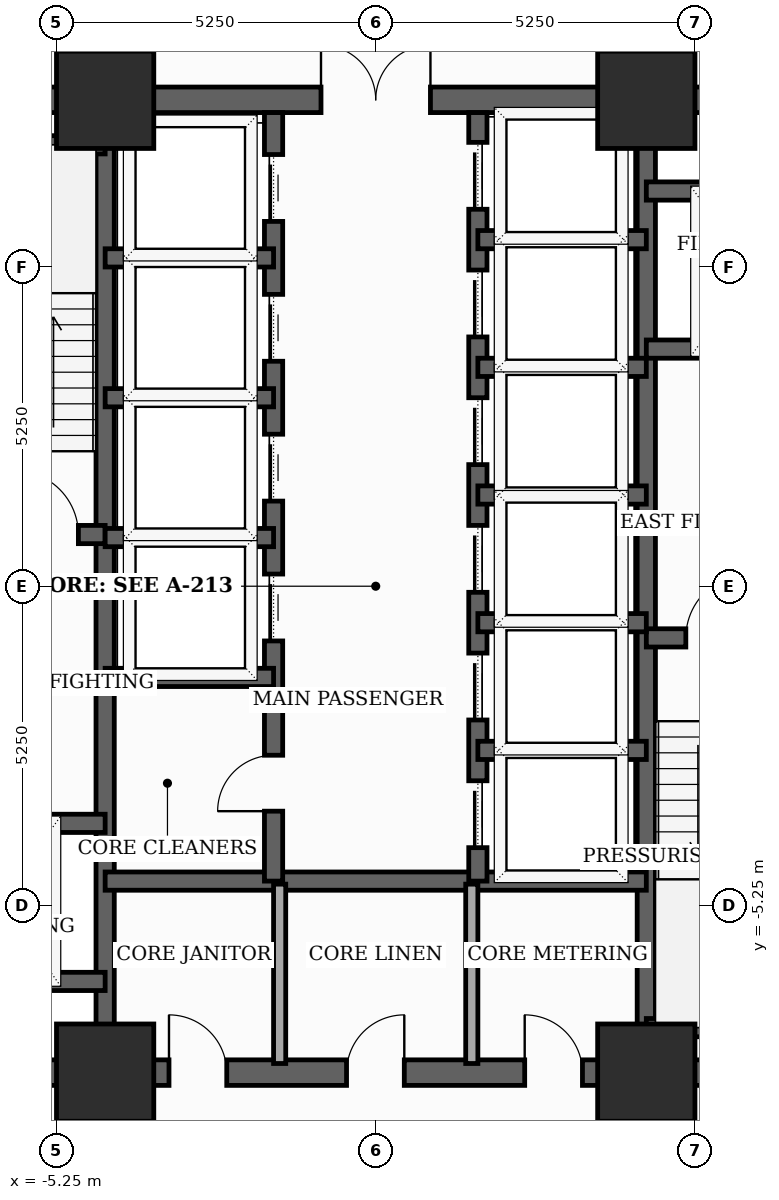
"""IFC4 building model, lengths in metres.
Left out: names, types, materials, properties, quantities, classifications, styles, units other than length and angle.
Written with IfcOpenShell. Run it as: python <this file> out.ifc"""

import sys

from ifc_helpers import new_model, si_unit, direction, frame, frame_2d, origin, origin_2d, place, context, subcontext, project, spatial, rectangle, extrude, element, fill, save


model = new_model("IFC4")
c1 = context("Model", 3, precision=1e-05, world=origin(), true_north=direction((0.0, 1.0)))
c2 = subcontext(c1, "Body", "Model", "MODEL_VIEW")
j1 = project(units=[si_unit("LENGTHUNIT", "METRE"), si_unit("PLANEANGLEUNIT", "RADIAN")], contexts=[c1])
p1 = place(None, origin())
s1 = spatial("IfcSite", under=j1, at=p1, CompositionType="ELEMENT")
p2 = place(p1, origin())
s2 = spatial("IfcBuilding", under=s1, at=p2, CompositionType="ELEMENT")
p3 = place(p2, frame((0.0, 0.0, 40.8)))
s3 = spatial("IfcBuildingStorey", under=s2, at=p3, CompositionType="ELEMENT", Elevation=40.8)
for number, where, z_axis, x_axis in (
    (1, (-4.45, -8.0, 0.0), (0.0, 0.0, 1.0), (1.0, 0.0, 0.0)),
    (2, (4.45, -8.0, 0.0), (0.0, 0.0, 1.0), (1.0, 0.0, 0.0)),
    (3, (4.45, 8.0, 0.0), (0.0, 0.0, 1.0), (1.0, 0.0, 0.0)),
    (4, (-4.45, 8.0, 0.0), (0.0, 0.0, 1.0), (1.0, 0.0, 0.0)),
):
    element("IfcColumn", number, at=place(p3, frame(where, z_axis=z_axis, x_axis=x_axis)), inside=s3, PredefinedType="COLUMN", context=c2, shape_type="SweptSolid", body=[
        extrude(rectangle(XDim=1.6, YDim=1.6, at=origin_2d()), origin(), (0.0, 0.0, 1.0), 3.7),
    ])
p4 = place(p3, frame((-8.0, -8.0, 0.0), z_axis=(0.0, 0.0, 1.0), x_axis=(1.0, 0.0, 0.0)))
e5 = element("IfcWall", 5, at=p4, inside=s3, PredefinedType="SHEAR", context=c2, shape_type="SweptSolid", body=[
    extrude(rectangle(XDim=16.0, YDim=0.42, at=frame_2d((8.0, 0.0))), origin(), (0.0, 0.0, 1.0), 3.5),
])
p5 = place(p4, frame((4.6, 0.0, 0.0)))
e6 = element("IfcOpeningElement", 6, at=p5, cuts=e5, PredefinedType="OPENING", context=c2, shape_type="SweptSolid", body=[
    extrude(rectangle(XDim=0.95, YDim=2.1, at=frame_2d((0.475, 1.05))), frame((0.0, 0.22, 0.0), z_axis=(0.0, -1.0, 0.0), x_axis=(1.0, 0.0, 0.0)), (0.0, 0.0, 1.0), 0.44),
])
p6 = place(p4, frame((7.52, 0.0, 0.0)))
e7 = element("IfcOpeningElement", 7, at=p6, cuts=e5, PredefinedType="OPENING", context=c2, shape_type="SweptSolid", body=[
    extrude(rectangle(XDim=0.95, YDim=2.1, at=frame_2d((0.475, 1.05))), frame((0.0, 0.22, 0.0), z_axis=(0.0, -1.0, 0.0), x_axis=(1.0, 0.0, 0.0)), (0.0, 0.0, 1.0), 0.44),
])
p7 = place(p4, frame((10.45, 0.0, 0.0)))
e8 = element("IfcOpeningElement", 8, at=p7, cuts=e5, PredefinedType="OPENING", context=c2, shape_type="SweptSolid", body=[
    extrude(rectangle(XDim=0.95, YDim=2.1, at=frame_2d((0.475, 1.05))), frame((0.0, 0.22, 0.0), z_axis=(0.0, -1.0, 0.0), x_axis=(1.0, 0.0, 0.0)), (0.0, 0.0, 1.0), 0.44),
])
p8 = place(p3, frame((-8.0, 8.0, 0.0), z_axis=(0.0, 0.0, 1.0), x_axis=(1.0, 0.0, 0.0)))
e9 = element("IfcWall", 9, at=p8, inside=s3, PredefinedType="SHEAR", context=c2, shape_type="SweptSolid", body=[
    extrude(rectangle(XDim=16.0, YDim=0.42, at=frame_2d((8.0, 0.0))), origin(), (0.0, 0.0, 1.0), 3.5),
])
p9 = place(p8, frame((7.1, 0.0, 0.0)))
e10 = element("IfcOpeningElement", 10, at=p9, cuts=e9, PredefinedType="OPENING", context=c2, shape_type="SweptSolid", body=[
    extrude(rectangle(XDim=1.8, YDim=2.15, at=frame_2d((0.9, 1.075))), frame((0.0, 0.22, 0.0), z_axis=(0.0, -1.0, 0.0), x_axis=(1.0, 0.0, 0.0)), (0.0, 0.0, 1.0), 0.44),
])
for number, where, z_axis, x_axis in (
    (11, (-4.45, -7.79, 0.0), (0.0, 0.0, 1.0), (0.0, 1.0, 0.0)),
    (12, (4.45, -7.79, 0.0), (0.0, 0.0, 1.0), (0.0, 1.0, 0.0)),
):
    element("IfcWall", number, at=place(p3, frame(where, z_axis=z_axis, x_axis=x_axis)), inside=s3, PredefinedType="SHEAR", context=c2, shape_type="SweptSolid", body=[
        extrude(rectangle(XDim=15.58, YDim=0.3, at=frame_2d((7.79, 0.0))), origin(), (0.0, 0.0, 1.0), 3.5),
    ])
p10 = place(p3, frame((-7.79, 0.85, 0.0), z_axis=(0.0, 0.0, 1.0), x_axis=(1.0, 0.0, 0.0)))
e13 = element("IfcWall", 13, at=p10, inside=s3, PredefinedType="SHEAR", context=c2, shape_type="SweptSolid", body=[
    extrude(rectangle(XDim=3.34, YDim=0.3, at=frame_2d((1.67, 0.0))), origin(), (0.0, 0.0, 1.0), 3.5),
])
p11 = place(p10, frame((1.85, 0.0, 0.0)))
e14 = element("IfcOpeningElement", 14, at=p11, cuts=e13, PredefinedType="OPENING", context=c2, shape_type="SweptSolid", body=[
    extrude(rectangle(XDim=1.05, YDim=2.15, at=frame_2d((0.525, 1.075))), frame((0.0, 0.16, 0.0), z_axis=(0.0, -1.0, 0.0), x_axis=(1.0, 0.0, 0.0)), (0.0, 0.0, 1.0), 0.32),
])
p12 = place(p3, frame((-7.79, 7.26, 0.0), z_axis=(0.0, 0.0, 1.0), x_axis=(1.0, 0.0, 0.0)))
e15 = element("IfcWall", 15, at=p12, inside=s3, PredefinedType="SHEAR", context=c2, shape_type="SweptSolid", body=[
    extrude(rectangle(XDim=3.34, YDim=0.3, at=frame_2d((1.67, 0.0))), origin(), (0.0, 0.0, 1.0), 3.5),
])
p13 = place(p3, frame((4.45, -0.85, 0.0), z_axis=(0.0, 0.0, 1.0), x_axis=(1.0, 0.0, 0.0)))
e16 = element("IfcWall", 16, at=p13, inside=s3, PredefinedType="SHEAR", context=c2, shape_type="SweptSolid", body=[
    extrude(rectangle(XDim=3.34, YDim=0.3, at=frame_2d((1.67, 0.0))), origin(), (0.0, 0.0, 1.0), 3.5),
])
p14 = place(p13, frame((0.65, 0.0, 0.0)))
e17 = element("IfcOpeningElement", 17, at=p14, cuts=e16, PredefinedType="OPENING", context=c2, shape_type="SweptSolid", body=[
    extrude(rectangle(XDim=1.05, YDim=2.15, at=frame_2d((0.525, 1.075))), frame((0.0, 0.16, 0.0), z_axis=(0.0, -1.0, 0.0), x_axis=(1.0, 0.0, 0.0)), (0.0, 0.0, 1.0), 0.32),
])
p15 = place(p3, frame((4.45, -7.26, 0.0), z_axis=(0.0, 0.0, 1.0), x_axis=(1.0, 0.0, 0.0)))
e18 = element("IfcWall", 18, at=p15, inside=s3, PredefinedType="SHEAR", context=c2, shape_type="SweptSolid", body=[
    extrude(rectangle(XDim=3.55, YDim=0.3, at=frame_2d((1.775, 0.0))), origin(), (0.0, 0.0, 1.0), 3.5),
])
p16 = place(p3, frame((-7.79, -3.9, 0.0), z_axis=(0.0, 0.0, 1.0), x_axis=(1.0, 0.0, 0.0)))
e19 = element("IfcWall", 19, at=p16, inside=s3, PredefinedType="SHEAR", context=c2, shape_type="SweptSolid", body=[
    extrude(rectangle(XDim=3.34, YDim=0.3, at=frame_2d((1.67, 0.0))), origin(), (0.0, 0.0, 1.0), 3.5),
])
p17 = place(p16, frame((1.27, 0.0, 0.0)))
e20 = element("IfcOpeningElement", 20, at=p17, cuts=e19, PredefinedType="OPENING", context=c2, shape_type="SweptSolid", body=[
    extrude(rectangle(XDim=1.1, YDim=2.1, at=frame_2d((0.55, 1.05))), frame((0.0, 0.16, 0.0), z_axis=(0.0, -1.0, 0.0), x_axis=(1.0, 0.0, 0.0)), (0.0, 0.0, 1.0), 0.32),
])
p18 = place(p3, frame((-7.79, -6.5, 0.0), z_axis=(0.0, 0.0, 1.0), x_axis=(1.0, 0.0, 0.0)))
e21 = element("IfcWall", 21, at=p18, inside=s3, PredefinedType="SHEAR", context=c2, shape_type="SweptSolid", body=[
    extrude(rectangle(XDim=3.34, YDim=0.3, at=frame_2d((1.67, 0.0))), origin(), (0.0, 0.0, 1.0), 3.5),
])
p19 = place(p3, frame((4.45, 3.9, 0.0), z_axis=(0.0, 0.0, 1.0), x_axis=(1.0, 0.0, 0.0)))
e22 = element("IfcWall", 22, at=p19, inside=s3, PredefinedType="SHEAR", context=c2, shape_type="SweptSolid", body=[
    extrude(rectangle(XDim=3.34, YDim=0.3, at=frame_2d((1.67, 0.0))), origin(), (0.0, 0.0, 1.0), 3.5),
])
p20 = place(p19, frame((1.18, 0.0, 0.0)))
e23 = element("IfcOpeningElement", 23, at=p20, cuts=e22, PredefinedType="OPENING", context=c2, shape_type="SweptSolid", body=[
    extrude(rectangle(XDim=1.1, YDim=2.1, at=frame_2d((0.55, 1.05))), frame((0.0, 0.16, 0.0), z_axis=(0.0, -1.0, 0.0), x_axis=(1.0, 0.0, 0.0)), (0.0, 0.0, 1.0), 0.32),
])
p21 = place(p3, frame((4.45, 6.5, 0.0), z_axis=(0.0, 0.0, 1.0), x_axis=(1.0, 0.0, 0.0)))
e24 = element("IfcWall", 24, at=p21, inside=s3, PredefinedType="SHEAR", context=c2, shape_type="SweptSolid", body=[
    extrude(rectangle(XDim=3.34, YDim=0.3, at=frame_2d((1.67, 0.0))), origin(), (0.0, 0.0, 1.0), 3.5),
])
p22 = place(p3, frame((-4.45, -4.85, 0.0), z_axis=(0.0, 0.0, 1.0), x_axis=(1.0, 0.0, 0.0)))
e25 = element("IfcWall", 25, at=p22, inside=s3, PredefinedType="SHEAR", context=c2, shape_type="SweptSolid", body=[
    extrude(rectangle(XDim=8.9, YDim=0.3, at=frame_2d((4.45, 0.0))), origin(), (0.0, 0.0, 1.0), 3.5),
])
p23 = place(p3, frame((-1.68, -4.85, 0.0), z_axis=(0.0, 0.0, 1.0), x_axis=(0.0, 1.0, 0.0)))
e26 = element("IfcWall", 26, at=p23, inside=s3, PredefinedType="SHEAR", context=c2, shape_type="SweptSolid", body=[
    extrude(rectangle(XDim=12.64, YDim=0.3, at=frame_2d((6.32, 0.0))), origin(), (0.0, 0.0, 1.0), 3.5),
])
p24 = place(p23, frame((3.95, 0.0, 0.0)))
e27 = element("IfcOpeningElement", 27, at=p24, cuts=e26, PredefinedType="OPENING", context=c2, shape_type="SweptSolid", body=[
    extrude(rectangle(XDim=1.1, YDim=2.1, at=frame_2d((0.55, 1.05))), frame((0.0, 0.16, 0.0), z_axis=(0.0, -1.0, 0.0), x_axis=(1.0, 0.0, 0.0)), (0.0, 0.0, 1.0), 0.32),
])
p25 = place(p23, frame((6.25, 0.0, 0.0)))
e28 = element("IfcOpeningElement", 28, at=p25, cuts=e26, PredefinedType="OPENING", context=c2, shape_type="SweptSolid", body=[
    extrude(rectangle(XDim=1.1, YDim=2.1, at=frame_2d((0.55, 1.05))), frame((0.0, 0.16, 0.0), z_axis=(0.0, -1.0, 0.0), x_axis=(1.0, 0.0, 0.0)), (0.0, 0.0, 1.0), 0.32),
])
p26 = place(p23, frame((8.55, 0.0, 0.0)))
e29 = element("IfcOpeningElement", 29, at=p26, cuts=e26, PredefinedType="OPENING", context=c2, shape_type="SweptSolid", body=[
    extrude(rectangle(XDim=1.1, YDim=2.1, at=frame_2d((0.55, 1.05))), frame((0.0, 0.16, 0.0), z_axis=(0.0, -1.0, 0.0), x_axis=(1.0, 0.0, 0.0)), (0.0, 0.0, 1.0), 0.32),
])
p27 = place(p23, frame((10.85, 0.0, 0.0)))
e30 = element("IfcOpeningElement", 30, at=p27, cuts=e26, PredefinedType="OPENING", context=c2, shape_type="SweptSolid", body=[
    extrude(rectangle(XDim=1.1, YDim=2.1, at=frame_2d((0.55, 1.05))), frame((0.0, 0.16, 0.0), z_axis=(0.0, -1.0, 0.0), x_axis=(1.0, 0.0, 0.0)), (0.0, 0.0, 1.0), 0.32),
])
p28 = place(p23, frame((1.15, 0.0, 0.0)))
e31 = element("IfcOpeningElement", 31, at=p28, cuts=e26, PredefinedType="OPENING", context=c2, shape_type="SweptSolid", body=[
    extrude(rectangle(XDim=0.92, YDim=2.1, at=frame_2d((0.46, 1.05))), frame((0.0, 0.16, 0.0), z_axis=(0.0, -1.0, 0.0), x_axis=(1.0, 0.0, 0.0)), (0.0, 0.0, 1.0), 0.32),
])
p29 = place(p3, frame((1.68, -4.85, 0.0), z_axis=(0.0, 0.0, 1.0), x_axis=(0.0, 1.0, 0.0)))
e32 = element("IfcWall", 32, at=p29, inside=s3, PredefinedType="SHEAR", context=c2, shape_type="SweptSolid", body=[
    extrude(rectangle(XDim=12.64, YDim=0.3, at=frame_2d((6.32, 0.0))), origin(), (0.0, 0.0, 1.0), 3.5),
])
p30 = place(p29, frame((0.55, 0.0, 0.0)))
e33 = element("IfcOpeningElement", 33, at=p30, cuts=e32, PredefinedType="OPENING", context=c2, shape_type="SweptSolid", body=[
    extrude(rectangle(XDim=1.1, YDim=2.1, at=frame_2d((0.55, 1.05))), frame((0.0, 0.16, 0.0), z_axis=(0.0, -1.0, 0.0), x_axis=(1.0, 0.0, 0.0)), (0.0, 0.0, 1.0), 0.32),
])
p31 = place(p29, frame((2.65, 0.0, 0.0)))
e34 = element("IfcOpeningElement", 34, at=p31, cuts=e32, PredefinedType="OPENING", context=c2, shape_type="SweptSolid", body=[
    extrude(rectangle(XDim=1.1, YDim=2.1, at=frame_2d((0.55, 1.05))), frame((0.0, 0.16, 0.0), z_axis=(0.0, -1.0, 0.0), x_axis=(1.0, 0.0, 0.0)), (0.0, 0.0, 1.0), 0.32),
])
p32 = place(p29, frame((4.75, 0.0, 0.0)))
e35 = element("IfcOpeningElement", 35, at=p32, cuts=e32, PredefinedType="OPENING", context=c2, shape_type="SweptSolid", body=[
    extrude(rectangle(XDim=1.1, YDim=2.1, at=frame_2d((0.55, 1.05))), frame((0.0, 0.16, 0.0), z_axis=(0.0, -1.0, 0.0), x_axis=(1.0, 0.0, 0.0)), (0.0, 0.0, 1.0), 0.32),
])
p33 = place(p29, frame((6.85, 0.0, 0.0)))
e36 = element("IfcOpeningElement", 36, at=p33, cuts=e32, PredefinedType="OPENING", context=c2, shape_type="SweptSolid", body=[
    extrude(rectangle(XDim=1.1, YDim=2.1, at=frame_2d((0.55, 1.05))), frame((0.0, 0.16, 0.0), z_axis=(0.0, -1.0, 0.0), x_axis=(1.0, 0.0, 0.0)), (0.0, 0.0, 1.0), 0.32),
])
p34 = place(p29, frame((8.95, 0.0, 0.0)))
e37 = element("IfcOpeningElement", 37, at=p34, cuts=e32, PredefinedType="OPENING", context=c2, shape_type="SweptSolid", body=[
    extrude(rectangle(XDim=1.1, YDim=2.1, at=frame_2d((0.55, 1.05))), frame((0.0, 0.16, 0.0), z_axis=(0.0, -1.0, 0.0), x_axis=(1.0, 0.0, 0.0)), (0.0, 0.0, 1.0), 0.32),
])
p35 = place(p29, frame((11.05, 0.0, 0.0)))
e38 = element("IfcOpeningElement", 38, at=p35, cuts=e32, PredefinedType="OPENING", context=c2, shape_type="SweptSolid", body=[
    extrude(rectangle(XDim=1.1, YDim=2.1, at=frame_2d((0.55, 1.05))), frame((0.0, 0.16, 0.0), z_axis=(0.0, -1.0, 0.0), x_axis=(1.0, 0.0, 0.0)), (0.0, 0.0, 1.0), 0.32),
])
for number, where, z_axis, x_axis in (
    (39, (-4.45, -1.5, 0.0), (0.0, 0.0, 1.0), (1.0, 0.0, 0.0)),
    (40, (-4.45, 0.8, 0.0), (0.0, 0.0, 1.0), (1.0, 0.0, 0.0)),
    (41, (-4.45, 3.1, 0.0), (0.0, 0.0, 1.0), (1.0, 0.0, 0.0)),
    (42, (-4.45, 5.4, 0.0), (0.0, 0.0, 1.0), (1.0, 0.0, 0.0)),
    (43, (1.68, 1.5, 0.0), (0.0, 0.0, 1.0), (1.0, 0.0, 0.0)),
    (44, (1.68, 3.6, 0.0), (0.0, 0.0, 1.0), (1.0, 0.0, 0.0)),
    (45, (1.68, 5.7, 0.0), (0.0, 0.0, 1.0), (1.0, 0.0, 0.0)),
    (46, (1.68, -2.7, 0.0), (0.0, 0.0, 1.0), (1.0, 0.0, 0.0)),
    (47, (1.68, -0.6, 0.0), (0.0, 0.0, 1.0), (1.0, 0.0, 0.0)),
):
    element("IfcWall", number, at=place(p3, frame(where, z_axis=z_axis, x_axis=x_axis)), inside=s3, PredefinedType="SHEAR", context=c2, shape_type="SweptSolid", body=[
        extrude(rectangle(XDim=2.77, YDim=0.3, at=frame_2d((1.385, 0.0))), origin(), (0.0, 0.0, 1.0), 3.5),
    ])
for number, where, z_axis, x_axis in (
    (48, (-1.58, -7.85, 0.0), (0.0, 0.0, 1.0), (0.0, 1.0, 0.0)),
    (49, (1.58, -7.85, 0.0), (0.0, 0.0, 1.0), (0.0, 1.0, 0.0)),
):
    element("IfcWall", number, at=place(p3, frame(where, z_axis=z_axis, x_axis=x_axis)), inside=s3, PredefinedType="SOLIDWALL", context=c2, shape_type="SweptSolid", body=[
        extrude(rectangle(XDim=2.95, YDim=0.2, at=frame_2d((1.475, 0.0))), origin(), (0.0, 0.0, 1.0), 2.885),
    ])
p36 = place(p5, origin())
e50 = element("IfcDoor", 50, at=p36, inside=s3, OperationType="SINGLE_SWING_LEFT", PredefinedType="DOOR", context=c2, shape_type="SweptSolid", body=[
    extrude(rectangle(XDim=0.95, YDim=2.1, at=frame_2d((0.475, 1.05))), frame((0.0, 0.025, 0.0), z_axis=(0.0, -1.0, 0.0), x_axis=(1.0, 0.0, 0.0)), (0.0, 0.0, 1.0), 0.05),
])
fill(e6, e50)
p37 = place(p6, origin())
e51 = element("IfcDoor", 51, at=p37, inside=s3, OperationType="SINGLE_SWING_RIGHT", PredefinedType="DOOR", context=c2, shape_type="SweptSolid", body=[
    extrude(rectangle(XDim=0.95, YDim=2.1, at=frame_2d((0.475, 1.05))), frame((0.0, 0.025, 0.0), z_axis=(0.0, -1.0, 0.0), x_axis=(1.0, 0.0, 0.0)), (0.0, 0.0, 1.0), 0.05),
])
fill(e7, e51)
p38 = place(p7, origin())
e52 = element("IfcDoor", 52, at=p38, inside=s3, OperationType="SINGLE_SWING_LEFT", PredefinedType="DOOR", context=c2, shape_type="SweptSolid", body=[
    extrude(rectangle(XDim=0.95, YDim=2.1, at=frame_2d((0.475, 1.05))), frame((0.0, 0.025, 0.0), z_axis=(0.0, -1.0, 0.0), x_axis=(1.0, 0.0, 0.0)), (0.0, 0.0, 1.0), 0.05),
])
fill(e8, e52)
p39 = place(p9, origin())
e53 = element("IfcDoor", 53, at=p39, inside=s3, OperationType="DOUBLE_DOOR_SINGLE_SWING", PredefinedType="DOOR", context=c2, shape_type="SweptSolid", body=[
    extrude(rectangle(XDim=1.8, YDim=2.15, at=frame_2d((0.9, 1.075))), frame((0.0, 0.025, 0.0), z_axis=(0.0, -1.0, 0.0), x_axis=(1.0, 0.0, 0.0)), (0.0, 0.0, 1.0), 0.05),
])
fill(e10, e53)
p40 = place(p11, origin())
e54 = element("IfcDoor", 54, at=p40, inside=s3, OperationType="SINGLE_SWING_LEFT", PredefinedType="DOOR", context=c2, shape_type="SweptSolid", body=[
    extrude(rectangle(XDim=1.05, YDim=2.15, at=frame_2d((0.525, 1.075))), frame((0.0, 0.025, 0.0), z_axis=(0.0, -1.0, 0.0), x_axis=(1.0, 0.0, 0.0)), (0.0, 0.0, 1.0), 0.05),
])
fill(e14, e54)
p41 = place(p14, origin())
e55 = element("IfcDoor", 55, at=p41, inside=s3, OperationType="SINGLE_SWING_RIGHT", PredefinedType="DOOR", context=c2, shape_type="SweptSolid", body=[
    extrude(rectangle(XDim=1.05, YDim=2.15, at=frame_2d((0.525, 1.075))), frame((0.0, 0.025, 0.0), z_axis=(0.0, -1.0, 0.0), x_axis=(1.0, 0.0, 0.0)), (0.0, 0.0, 1.0), 0.05),
])
fill(e17, e55)
p42 = place(p24, origin())
e56 = element("IfcDoor", 56, at=p42, inside=s3, OperationType="SLIDING_TO_LEFT", PredefinedType="DOOR", context=c2, shape_type="SweptSolid", body=[
    extrude(rectangle(XDim=1.1, YDim=2.1, at=frame_2d((0.55, 1.05))), frame((0.0, 0.025, 0.0), z_axis=(0.0, -1.0, 0.0), x_axis=(1.0, 0.0, 0.0)), (0.0, 0.0, 1.0), 0.05),
])
fill(e27, e56)
p43 = place(p25, origin())
e57 = element("IfcDoor", 57, at=p43, inside=s3, OperationType="SLIDING_TO_LEFT", PredefinedType="DOOR", context=c2, shape_type="SweptSolid", body=[
    extrude(rectangle(XDim=1.1, YDim=2.1, at=frame_2d((0.55, 1.05))), frame((0.0, 0.025, 0.0), z_axis=(0.0, -1.0, 0.0), x_axis=(1.0, 0.0, 0.0)), (0.0, 0.0, 1.0), 0.05),
])
fill(e28, e57)
p44 = place(p26, origin())
e58 = element("IfcDoor", 58, at=p44, inside=s3, OperationType="SLIDING_TO_LEFT", PredefinedType="DOOR", context=c2, shape_type="SweptSolid", body=[
    extrude(rectangle(XDim=1.1, YDim=2.1, at=frame_2d((0.55, 1.05))), frame((0.0, 0.025, 0.0), z_axis=(0.0, -1.0, 0.0), x_axis=(1.0, 0.0, 0.0)), (0.0, 0.0, 1.0), 0.05),
])
fill(e29, e58)
p45 = place(p27, origin())
e59 = element("IfcDoor", 59, at=p45, inside=s3, OperationType="SLIDING_TO_LEFT", PredefinedType="DOOR", context=c2, shape_type="SweptSolid", body=[
    extrude(rectangle(XDim=1.1, YDim=2.1, at=frame_2d((0.55, 1.05))), frame((0.0, 0.025, 0.0), z_axis=(0.0, -1.0, 0.0), x_axis=(1.0, 0.0, 0.0)), (0.0, 0.0, 1.0), 0.05),
])
fill(e30, e59)
p46 = place(p28, origin())
e60 = element("IfcDoor", 60, at=p46, inside=s3, OperationType="SINGLE_SWING_LEFT", PredefinedType="DOOR", context=c2, shape_type="SweptSolid", body=[
    extrude(rectangle(XDim=0.92, YDim=2.1, at=frame_2d((0.46, 1.05))), frame((0.0, 0.025, 0.0), z_axis=(0.0, -1.0, 0.0), x_axis=(1.0, 0.0, 0.0)), (0.0, 0.0, 1.0), 0.05),
])
fill(e31, e60)
p47 = place(p30, origin())
e61 = element("IfcDoor", 61, at=p47, inside=s3, OperationType="SLIDING_TO_LEFT", PredefinedType="DOOR", context=c2, shape_type="SweptSolid", body=[
    extrude(rectangle(XDim=1.1, YDim=2.1, at=frame_2d((0.55, 1.05))), frame((0.0, 0.025, 0.0), z_axis=(0.0, -1.0, 0.0), x_axis=(1.0, 0.0, 0.0)), (0.0, 0.0, 1.0), 0.05),
])
fill(e33, e61)
p48 = place(p31, origin())
e62 = element("IfcDoor", 62, at=p48, inside=s3, OperationType="SLIDING_TO_LEFT", PredefinedType="DOOR", context=c2, shape_type="SweptSolid", body=[
    extrude(rectangle(XDim=1.1, YDim=2.1, at=frame_2d((0.55, 1.05))), frame((0.0, 0.025, 0.0), z_axis=(0.0, -1.0, 0.0), x_axis=(1.0, 0.0, 0.0)), (0.0, 0.0, 1.0), 0.05),
])
fill(e34, e62)
p49 = place(p32, origin())
e63 = element("IfcDoor", 63, at=p49, inside=s3, OperationType="SLIDING_TO_LEFT", PredefinedType="DOOR", context=c2, shape_type="SweptSolid", body=[
    extrude(rectangle(XDim=1.1, YDim=2.1, at=frame_2d((0.55, 1.05))), frame((0.0, 0.025, 0.0), z_axis=(0.0, -1.0, 0.0), x_axis=(1.0, 0.0, 0.0)), (0.0, 0.0, 1.0), 0.05),
])
fill(e35, e63)
p50 = place(p33, origin())
e64 = element("IfcDoor", 64, at=p50, inside=s3, OperationType="SLIDING_TO_LEFT", PredefinedType="DOOR", context=c2, shape_type="SweptSolid", body=[
    extrude(rectangle(XDim=1.1, YDim=2.1, at=frame_2d((0.55, 1.05))), frame((0.0, 0.025, 0.0), z_axis=(0.0, -1.0, 0.0), x_axis=(1.0, 0.0, 0.0)), (0.0, 0.0, 1.0), 0.05),
])
fill(e36, e64)
p51 = place(p34, origin())
e65 = element("IfcDoor", 65, at=p51, inside=s3, OperationType="SLIDING_TO_LEFT", PredefinedType="DOOR", context=c2, shape_type="SweptSolid", body=[
    extrude(rectangle(XDim=1.1, YDim=2.1, at=frame_2d((0.55, 1.05))), frame((0.0, 0.025, 0.0), z_axis=(0.0, -1.0, 0.0), x_axis=(1.0, 0.0, 0.0)), (0.0, 0.0, 1.0), 0.05),
])
fill(e37, e65)
p52 = place(p35, origin())
e66 = element("IfcDoor", 66, at=p52, inside=s3, OperationType="SLIDING_TO_LEFT", PredefinedType="DOOR", context=c2, shape_type="SweptSolid", body=[
    extrude(rectangle(XDim=1.1, YDim=2.1, at=frame_2d((0.55, 1.05))), frame((0.0, 0.025, 0.0), z_axis=(0.0, -1.0, 0.0), x_axis=(1.0, 0.0, 0.0)), (0.0, 0.0, 1.0), 0.05),
])
fill(e38, e66)
save(model, sys.argv[1])
